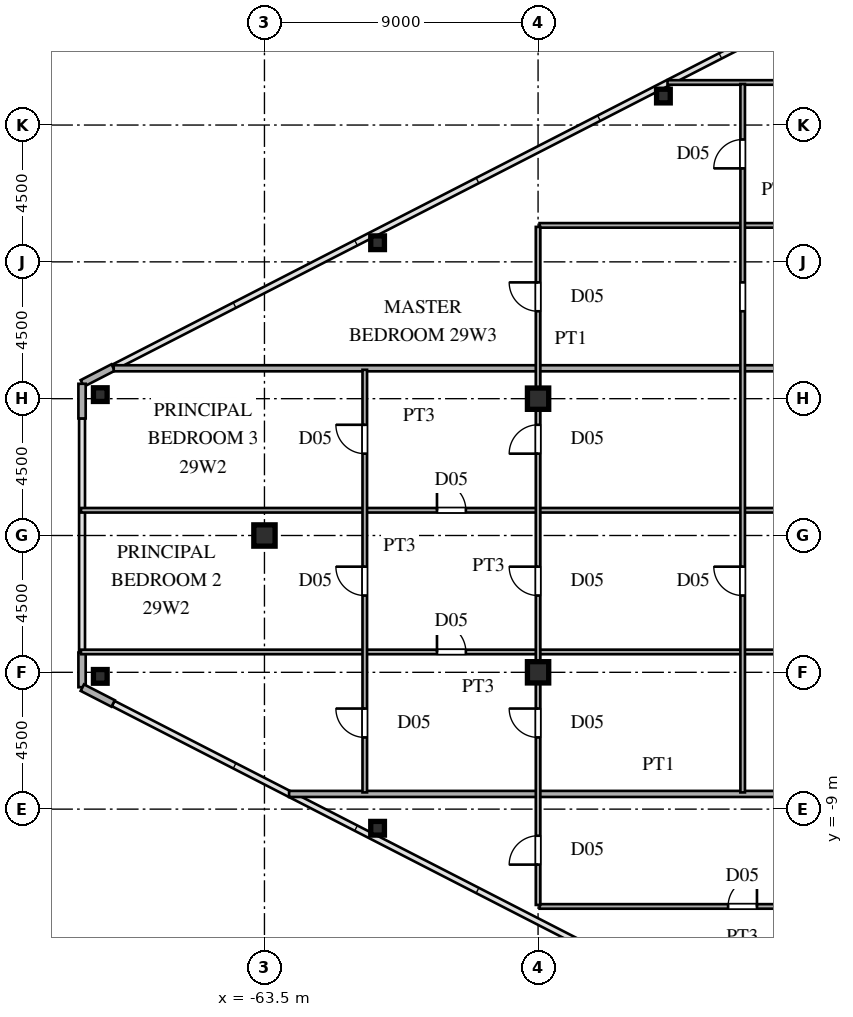
"""IFC4 building model, lengths in metres.
Left out: names, types, materials, properties, quantities, classifications, styles, units other than length and angle.
Written with IfcOpenShell. Run it as: python <this file> out.ifc"""

import sys

from ifc_helpers import new_model, si_unit, direction, frame, frame_2d, origin, origin_2d, place, context, subcontext, project, spatial, rectangle, hollow_rectangle, i_section, extrude, source, transform, mapped, element, fill, save


model = new_model("IFC4")
c1 = context("Model", 3, precision=1e-05, world=origin(), true_north=direction((0.0, 1.0)))
c2 = subcontext(c1, "Body", "Model", "MODEL_VIEW")
j1 = project(units=[si_unit("LENGTHUNIT", "METRE"), si_unit("PLANEANGLEUNIT", "RADIAN")], contexts=[c1])
p1 = place(None, origin())
s1 = spatial("IfcSite", under=j1, at=p1, CompositionType="ELEMENT")
p2 = place(p1, origin())
s2 = spatial("IfcBuilding", under=s1, at=p2, CompositionType="ELEMENT")
p3 = place(p2, frame((0.0, 0.0, 110.4)))
s3 = spatial("IfcBuildingStorey", under=s2, at=p3, CompositionType="ELEMENT", Elevation=110.4)
m1 = source(origin(), c2, "Body", "SweptSolid", [
    extrude(i_section(OverallWidth=0.7, OverallDepth=0.7, WebThickness=0.028, FlangeThickness=0.045, at=origin_2d()), origin(), (0.0, 0.0, 1.0), 3.6),
])
for number, where, z_axis, x_axis in (
    (1, (-54.5, -4.5, 0.0), (0.0, 0.0, 1.0), (1.0, 0.0, 0.0)),
    (2, (-54.5, 4.5, 0.0), (0.0, 0.0, 1.0), (1.0, 0.0, 0.0)),
    (3, (-63.5, 0.0, 0.0), (0.0, 0.0, 1.0), (1.0, 0.0, 0.0)),
):
    element("IfcColumn", number, at=place(p3, frame(where, z_axis=z_axis, x_axis=x_axis)), inside=s3, PredefinedType="COLUMN", context=c2, shape_type="MappedRepresentation", body=[
        mapped(m1, transform((0.0, 0.0, 0.0), scale=1.0)),
    ])
m2 = source(origin(), c2, "Body", "SweptSolid", [
    extrude(hollow_rectangle(XDim=0.45, YDim=0.45, WallThickness=0.018, at=origin_2d()), origin(), (0.0, 0.0, 1.0), 3.6),
])
for number, where, z_axis, x_axis in (
    (4, (-68.9, 4.634, 0.0), (0.0, 0.0, 1.0), (1.0, 0.0, 0.0)),
    (5, (-68.9, -4.634, 0.0), (0.0, 0.0, 1.0), (1.0, 0.0, 0.0)),
    (6, (-59.779, -9.629, 0.0), (0.0, 0.0, 1.0), (1.0, 0.0, 0.0)),
    (7, (-50.377, 14.453, 0.0), (0.0, 0.0, 1.0), (1.0, 0.0, 0.0)),
    (8, (-59.779, 9.629, 0.0), (0.0, 0.0, 1.0), (1.0, 0.0, 0.0)),
):
    element("IfcColumn", number, at=place(p3, frame(where, z_axis=z_axis, x_axis=x_axis)), inside=s3, PredefinedType="COLUMN", context=c2, shape_type="MappedRepresentation", body=[
        mapped(m2, transform((0.0, 0.0, 0.0), scale=1.0)),
    ])
p4 = place(p3, frame((-68.477, 5.525, 0.0), z_axis=(0.0, 0.0, 1.0), x_axis=(-0.889797395748, -0.456355776255, 0.0)))
e9 = element("IfcWall", 9, at=p4, inside=s3, PredefinedType="SOLIDWALL", context=c2, shape_type="SweptSolid", body=[
    extrude(rectangle(XDim=1.14, YDim=0.24, at=frame_2d((0.57, 0.0))), origin(), (0.0, 0.0, 1.0), 3.38),
])
for number, where, z_axis, x_axis in (
    (10, (-69.5, 4.99, 0.0), (0.0, 0.0, 1.0), (0.0, -1.0, 0.0)),
    (11, (-69.5, -3.85, 0.0), (0.0, 0.0, 1.0), (0.0, -1.0, 0.0)),
):
    element("IfcWall", number, at=place(p3, frame(where, z_axis=z_axis, x_axis=x_axis)), inside=s3, PredefinedType="SOLIDWALL", context=c2, shape_type="SweptSolid", body=[
        extrude(rectangle(XDim=1.14, YDim=0.24, at=frame_2d((0.57, 0.0))), origin(), (0.0, 0.0, 1.0), 3.38),
    ])
p5 = place(p3, frame((-69.491, -5.005, 0.0), z_axis=(0.0, 0.0, 1.0), x_axis=(0.889797395748, -0.456355776255, 0.0)))
e12 = element("IfcWall", 12, at=p5, inside=s3, PredefinedType="SOLIDWALL", context=c2, shape_type="SweptSolid", body=[
    extrude(rectangle(XDim=1.14, YDim=0.24, at=frame_2d((0.57, 0.0))), origin(), (0.0, 0.0, 1.0), 3.38),
])
p6 = place(p3, frame((-54.45, -12.2, 0.0), z_axis=(0.0, 0.0, 1.0), x_axis=(1.0, 0.0, 0.0)))
e13 = element("IfcWall", 13, at=p6, inside=s3, PredefinedType="PARTITIONING", context=c2, shape_type="SweptSolid", body=[
    extrude(rectangle(XDim=13.35, YDim=0.15, at=frame_2d((6.675, 0.0))), origin(), (0.0, 0.0, 1.0), 3.38),
])
p7 = place(p6, frame((6.2, 0.0, 0.0)))
e14 = element("IfcOpeningElement", 14, at=p7, cuts=e13, PredefinedType="OPENING", context=c2, shape_type="SweptSolid", body=[
    extrude(rectangle(XDim=0.95, YDim=2.15, at=frame_2d((0.475, 1.075))), frame((0.0, 0.085, 0.0), z_axis=(0.0, -1.0, 0.0), x_axis=(1.0, 0.0, 0.0)), (0.0, 0.0, 1.0), 0.17),
])
p8 = place(p3, frame((-62.69, -8.5, 0.0), z_axis=(0.0, 0.0, 1.0), x_axis=(1.0, 0.0, 0.0)))
e15 = element("IfcWall", 15, at=p8, inside=s3, PredefinedType="PARTITIONING", context=c2, shape_type="SweptSolid", body=[
    extrude(rectangle(XDim=24.31, YDim=0.2, at=frame_2d((12.155, 0.0))), origin(), (0.0, 0.0, 1.0), 3.38),
])
p9 = place(p3, frame((-69.535, -3.83, 0.0), z_axis=(0.0, 0.0, 1.0), x_axis=(1.0, 0.0, 0.0)))
e16 = element("IfcWall", 16, at=p9, inside=s3, PredefinedType="PARTITIONING", context=c2, shape_type="SweptSolid", body=[
    extrude(rectangle(XDim=28.435, YDim=0.15, at=frame_2d((14.217, 0.0))), origin(), (0.0, 0.0, 1.0), 3.38),
])
p10 = place(p9, frame((24.647, 0.0, 0.0)))
e17 = element("IfcOpeningElement", 17, at=p10, cuts=e16, PredefinedType="OPENING", context=c2, shape_type="SweptSolid", body=[
    extrude(rectangle(XDim=0.95, YDim=2.15, at=frame_2d((0.475, 1.075))), frame((0.0, 0.085, 0.0), z_axis=(0.0, -1.0, 0.0), x_axis=(1.0, 0.0, 0.0)), (0.0, 0.0, 1.0), 0.17),
])
p11 = place(p9, frame((11.71, 0.0, 0.0)))
e18 = element("IfcOpeningElement", 18, at=p11, cuts=e16, PredefinedType="OPENING", context=c2, shape_type="SweptSolid", body=[
    extrude(rectangle(XDim=0.95, YDim=2.15, at=frame_2d((0.475, 1.075))), frame((0.0, 0.085, 0.0), z_axis=(0.0, -1.0, 0.0), x_axis=(1.0, 0.0, 0.0)), (0.0, 0.0, 1.0), 0.17),
])
p12 = place(p3, frame((-69.535, 0.83, 0.0), z_axis=(0.0, 0.0, 1.0), x_axis=(1.0, 0.0, 0.0)))
e19 = element("IfcWall", 19, at=p12, inside=s3, PredefinedType="PARTITIONING", context=c2, shape_type="SweptSolid", body=[
    extrude(rectangle(XDim=28.435, YDim=0.15, at=frame_2d((14.217, 0.0))), origin(), (0.0, 0.0, 1.0), 3.38),
])
p13 = place(p12, frame((24.647, 0.0, 0.0)))
e20 = element("IfcOpeningElement", 20, at=p13, cuts=e19, PredefinedType="OPENING", context=c2, shape_type="SweptSolid", body=[
    extrude(rectangle(XDim=0.95, YDim=2.15, at=frame_2d((0.475, 1.075))), frame((0.0, 0.085, 0.0), z_axis=(0.0, -1.0, 0.0), x_axis=(1.0, 0.0, 0.0)), (0.0, 0.0, 1.0), 0.17),
])
p14 = place(p12, frame((11.71, 0.0, 0.0)))
e21 = element("IfcOpeningElement", 21, at=p14, cuts=e19, PredefinedType="OPENING", context=c2, shape_type="SweptSolid", body=[
    extrude(rectangle(XDim=0.95, YDim=2.15, at=frame_2d((0.475, 1.075))), frame((0.0, 0.085, 0.0), z_axis=(0.0, -1.0, 0.0), x_axis=(1.0, 0.0, 0.0)), (0.0, 0.0, 1.0), 0.17),
])
p15 = place(p3, frame((-68.458, 5.5, 0.0), z_axis=(0.0, 0.0, 1.0), x_axis=(1.0, 0.0, 0.0)))
e22 = element("IfcWall", 22, at=p15, inside=s3, PredefinedType="PARTITIONING", context=c2, shape_type="SweptSolid", body=[
    extrude(rectangle(XDim=30.079, YDim=0.2, at=frame_2d((15.039, 0.0))), origin(), (0.0, 0.0, 1.0), 3.38),
])
p16 = place(p3, frame((-54.45, 10.2, 0.0), z_axis=(0.0, 0.0, 1.0), x_axis=(1.0, 0.0, 0.0)))
e23 = element("IfcWall", 23, at=p16, inside=s3, PredefinedType="PARTITIONING", context=c2, shape_type="SweptSolid", body=[
    extrude(rectangle(XDim=13.35, YDim=0.15, at=frame_2d((6.675, 0.0))), origin(), (0.0, 0.0, 1.0), 3.38),
])
p17 = place(p16, frame((9.562, 0.0, 0.0)))
e24 = element("IfcOpeningElement", 24, at=p17, cuts=e23, PredefinedType="OPENING", context=c2, shape_type="SweptSolid", body=[
    extrude(rectangle(XDim=0.95, YDim=2.15, at=frame_2d((0.475, 1.075))), frame((0.0, 0.085, 0.0), z_axis=(0.0, -1.0, 0.0), x_axis=(1.0, 0.0, 0.0)), (0.0, 0.0, 1.0), 0.17),
])
p18 = place(p3, frame((-50.243, 14.9, 0.0), z_axis=(0.0, 0.0, 1.0), x_axis=(1.0, 0.0, 0.0)))
e25 = element("IfcWall", 25, at=p18, inside=s3, PredefinedType="PARTITIONING", context=c2, shape_type="SweptSolid", body=[
    extrude(rectangle(XDim=9.143, YDim=0.15, at=frame_2d((4.571, 0.0))), origin(), (0.0, 0.0, 1.0), 3.38),
])
p19 = place(p18, frame((5.355, 0.0, 0.0)))
e26 = element("IfcOpeningElement", 26, at=p19, cuts=e25, PredefinedType="OPENING", context=c2, shape_type="SweptSolid", body=[
    extrude(rectangle(XDim=0.95, YDim=2.15, at=frame_2d((0.475, 1.075))), frame((0.0, 0.085, 0.0), z_axis=(0.0, -1.0, 0.0), x_axis=(1.0, 0.0, 0.0)), (0.0, 0.0, 1.0), 0.17),
])
p20 = place(p3, frame((-60.2, -8.45, 0.0), z_axis=(0.0, 0.0, 1.0), x_axis=(0.0, 1.0, 0.0)))
e27 = element("IfcWall", 27, at=p20, inside=s3, PredefinedType="PARTITIONING", context=c2, shape_type="SweptSolid", body=[
    extrude(rectangle(XDim=13.9, YDim=0.15, at=frame_2d((6.95, 0.0))), origin(), (0.0, 0.0, 1.0), 3.38),
])
p21 = place(p20, frame((1.808, 0.0, 0.0)))
e28 = element("IfcOpeningElement", 28, at=p21, cuts=e27, PredefinedType="OPENING", context=c2, shape_type="SweptSolid", body=[
    extrude(rectangle(XDim=0.95, YDim=2.15, at=frame_2d((0.475, 1.075))), frame((0.0, 0.085, 0.0), z_axis=(0.0, -1.0, 0.0), x_axis=(1.0, 0.0, 0.0)), (0.0, 0.0, 1.0), 0.17),
])
p22 = place(p20, frame((6.475, 0.0, 0.0)))
e29 = element("IfcOpeningElement", 29, at=p22, cuts=e27, PredefinedType="OPENING", context=c2, shape_type="SweptSolid", body=[
    extrude(rectangle(XDim=0.95, YDim=2.15, at=frame_2d((0.475, 1.075))), frame((0.0, 0.085, 0.0), z_axis=(0.0, -1.0, 0.0), x_axis=(1.0, 0.0, 0.0)), (0.0, 0.0, 1.0), 0.17),
])
p23 = place(p20, frame((11.142, 0.0, 0.0)))
e30 = element("IfcOpeningElement", 30, at=p23, cuts=e27, PredefinedType="OPENING", context=c2, shape_type="SweptSolid", body=[
    extrude(rectangle(XDim=0.95, YDim=2.15, at=frame_2d((0.475, 1.075))), frame((0.0, 0.085, 0.0), z_axis=(0.0, -1.0, 0.0), x_axis=(1.0, 0.0, 0.0)), (0.0, 0.0, 1.0), 0.17),
])
p24 = place(p3, frame((-54.5, -12.15, 0.0), z_axis=(0.0, 0.0, 1.0), x_axis=(0.0, 1.0, 0.0)))
e31 = element("IfcWall", 31, at=p24, inside=s3, PredefinedType="PARTITIONING", context=c2, shape_type="SweptSolid", body=[
    extrude(rectangle(XDim=22.3, YDim=0.15, at=frame_2d((11.15, 0.0))), origin(), (0.0, 0.0, 1.0), 2.78),
])
p25 = place(p24, frame((1.325, 0.0, 0.0)))
e32 = element("IfcOpeningElement", 32, at=p25, cuts=e31, PredefinedType="OPENING", context=c2, shape_type="SweptSolid", body=[
    extrude(rectangle(XDim=0.95, YDim=2.15, at=frame_2d((0.475, 1.075))), frame((0.0, 0.085, 0.0), z_axis=(0.0, -1.0, 0.0), x_axis=(1.0, 0.0, 0.0)), (0.0, 0.0, 1.0), 0.17),
])
p26 = place(p24, frame((10.175, 0.0, 0.0)))
e33 = element("IfcOpeningElement", 33, at=p26, cuts=e31, PredefinedType="OPENING", context=c2, shape_type="SweptSolid", body=[
    extrude(rectangle(XDim=0.95, YDim=2.15, at=frame_2d((0.475, 1.075))), frame((0.0, 0.085, 0.0), z_axis=(0.0, -1.0, 0.0), x_axis=(1.0, 0.0, 0.0)), (0.0, 0.0, 1.0), 0.17),
])
p27 = place(p24, frame((5.508, 0.0, 0.0)))
e34 = element("IfcOpeningElement", 34, at=p27, cuts=e31, PredefinedType="OPENING", context=c2, shape_type="SweptSolid", body=[
    extrude(rectangle(XDim=0.95, YDim=2.15, at=frame_2d((0.475, 1.075))), frame((0.0, 0.085, 0.0), z_axis=(0.0, -1.0, 0.0), x_axis=(1.0, 0.0, 0.0)), (0.0, 0.0, 1.0), 0.17),
])
p28 = place(p24, frame((14.842, 0.0, 0.0)))
e35 = element("IfcOpeningElement", 35, at=p28, cuts=e31, PredefinedType="OPENING", context=c2, shape_type="SweptSolid", body=[
    extrude(rectangle(XDim=0.95, YDim=2.15, at=frame_2d((0.475, 1.075))), frame((0.0, 0.085, 0.0), z_axis=(0.0, -1.0, 0.0), x_axis=(1.0, 0.0, 0.0)), (0.0, 0.0, 1.0), 0.17),
])
p29 = place(p24, frame((19.525, 0.0, 0.0)))
e36 = element("IfcOpeningElement", 36, at=p29, cuts=e31, PredefinedType="OPENING", context=c2, shape_type="SweptSolid", body=[
    extrude(rectangle(XDim=0.95, YDim=2.15, at=frame_2d((0.475, 1.075))), frame((0.0, 0.085, 0.0), z_axis=(0.0, -1.0, 0.0), x_axis=(1.0, 0.0, 0.0)), (0.0, 0.0, 1.0), 0.17),
])
p30 = place(p3, frame((-47.77, -8.45, 0.0), z_axis=(0.0, 0.0, 1.0), x_axis=(0.0, 1.0, 0.0)))
e37 = element("IfcWall", 37, at=p30, inside=s3, PredefinedType="PARTITIONING", context=c2, shape_type="SweptSolid", body=[
    extrude(rectangle(XDim=23.3, YDim=0.15, at=frame_2d((11.65, 0.0))), origin(), (0.0, 0.0, 1.0), 3.38),
])
p31 = place(p30, frame((6.475, 0.0, 0.0)))
e38 = element("IfcOpeningElement", 38, at=p31, cuts=e37, PredefinedType="OPENING", context=c2, shape_type="SweptSolid", body=[
    extrude(rectangle(XDim=0.95, YDim=2.15, at=frame_2d((0.475, 1.075))), frame((0.0, 0.085, 0.0), z_axis=(0.0, -1.0, 0.0), x_axis=(1.0, 0.0, 0.0)), (0.0, 0.0, 1.0), 0.17),
])
p32 = place(p30, frame((20.525, 0.0, 0.0)))
e39 = element("IfcOpeningElement", 39, at=p32, cuts=e37, PredefinedType="OPENING", context=c2, shape_type="SweptSolid", body=[
    extrude(rectangle(XDim=0.95, YDim=2.15, at=frame_2d((0.475, 1.075))), frame((0.0, 0.085, 0.0), z_axis=(0.0, -1.0, 0.0), x_axis=(1.0, 0.0, 0.0)), (0.0, 0.0, 1.0), 0.17),
])
p33 = place(p30, frame((15.825, 0.0, 0.0)))
e40 = element("IfcOpeningElement", 40, at=p33, cuts=e37, PredefinedType="OPENING", context=c2, shape_type="SweptSolid", body=[
    extrude(rectangle(XDim=0.95, YDim=2.15, at=frame_2d((0.475, 1.075))), frame((0.0, 0.085, 0.0), z_axis=(0.0, -1.0, 0.0), x_axis=(1.0, 0.0, 0.0)), (0.0, 0.0, 1.0), 0.17),
])
m3 = source(origin(), c2, "Body", "SweptSolid", [
    extrude(rectangle(XDim=0.95, YDim=2.15, at=frame_2d((0.475, 1.075))), frame((0.0, 0.025, 0.0), z_axis=(0.0, -1.0, 0.0), x_axis=(1.0, 0.0, 0.0)), (0.0, 0.0, 1.0), 0.05),
])
p34 = place(p7, origin())
e41 = element("IfcDoor", 41, at=p34, inside=s3, OperationType="SINGLE_SWING_RIGHT", PredefinedType="DOOR", context=c2, shape_type="MappedRepresentation", body=[
    mapped(m3, transform((0.0, 0.0, 0.0), scale=1.0)),
])
fill(e14, e41)
p35 = place(p11, origin())
e42 = element("IfcDoor", 42, at=p35, inside=s3, OperationType="SINGLE_SWING_LEFT", PredefinedType="DOOR", context=c2, shape_type="MappedRepresentation", body=[
    mapped(m3, transform((0.0, 0.0, 0.0), scale=1.0)),
])
fill(e18, e42)
p36 = place(p14, origin())
e43 = element("IfcDoor", 43, at=p36, inside=s3, OperationType="SINGLE_SWING_LEFT", PredefinedType="DOOR", context=c2, shape_type="MappedRepresentation", body=[
    mapped(m3, transform((0.0, 0.0, 0.0), scale=1.0)),
])
fill(e21, e43)
p37 = place(p21, origin())
e44 = element("IfcDoor", 44, at=p37, inside=s3, OperationType="SINGLE_SWING_RIGHT", PredefinedType="DOOR", context=c2, shape_type="MappedRepresentation", body=[
    mapped(m3, transform((0.0, 0.0, 0.0), scale=1.0)),
])
fill(e28, e44)
p38 = place(p22, origin())
e45 = element("IfcDoor", 45, at=p38, inside=s3, OperationType="SINGLE_SWING_RIGHT", PredefinedType="DOOR", context=c2, shape_type="MappedRepresentation", body=[
    mapped(m3, transform((0.0, 0.0, 0.0), scale=1.0)),
])
fill(e29, e45)
p39 = place(p23, origin())
e46 = element("IfcDoor", 46, at=p39, inside=s3, OperationType="SINGLE_SWING_RIGHT", PredefinedType="DOOR", context=c2, shape_type="MappedRepresentation", body=[
    mapped(m3, transform((0.0, 0.0, 0.0), scale=1.0)),
])
fill(e30, e46)
p40 = place(p25, origin())
e47 = element("IfcDoor", 47, at=p40, inside=s3, OperationType="SINGLE_SWING_LEFT", PredefinedType="DOOR", context=c2, shape_type="MappedRepresentation", body=[
    mapped(m3, transform((0.0, 0.0, 0.0), scale=1.0)),
])
fill(e32, e47)
p41 = place(p26, origin())
e48 = element("IfcDoor", 48, at=p41, inside=s3, OperationType="SINGLE_SWING_RIGHT", PredefinedType="DOOR", context=c2, shape_type="MappedRepresentation", body=[
    mapped(m3, transform((0.0, 0.0, 0.0), scale=1.0)),
])
fill(e33, e48)
p42 = place(p27, origin())
e49 = element("IfcDoor", 49, at=p42, inside=s3, OperationType="SINGLE_SWING_RIGHT", PredefinedType="DOOR", context=c2, shape_type="MappedRepresentation", body=[
    mapped(m3, transform((0.0, 0.0, 0.0), scale=1.0)),
])
fill(e34, e49)
p43 = place(p28, origin())
e50 = element("IfcDoor", 50, at=p43, inside=s3, OperationType="SINGLE_SWING_LEFT", PredefinedType="DOOR", context=c2, shape_type="MappedRepresentation", body=[
    mapped(m3, transform((0.0, 0.0, 0.0), scale=1.0)),
])
fill(e35, e50)
p44 = place(p29, origin())
e51 = element("IfcDoor", 51, at=p44, inside=s3, OperationType="SINGLE_SWING_RIGHT", PredefinedType="DOOR", context=c2, shape_type="MappedRepresentation", body=[
    mapped(m3, transform((0.0, 0.0, 0.0), scale=1.0)),
])
fill(e36, e51)
p45 = place(p31, origin())
e52 = element("IfcDoor", 52, at=p45, inside=s3, OperationType="SINGLE_SWING_RIGHT", PredefinedType="DOOR", context=c2, shape_type="MappedRepresentation", body=[
    mapped(m3, transform((0.0, 0.0, 0.0), scale=1.0)),
])
fill(e38, e52)
p46 = place(p32, origin())
e53 = element("IfcDoor", 53, at=p46, inside=s3, OperationType="SINGLE_SWING_LEFT", PredefinedType="DOOR", context=c2, shape_type="MappedRepresentation", body=[
    mapped(m3, transform((0.0, 0.0, 0.0), scale=1.0)),
])
fill(e39, e53)
save(model, sys.argv[1])
